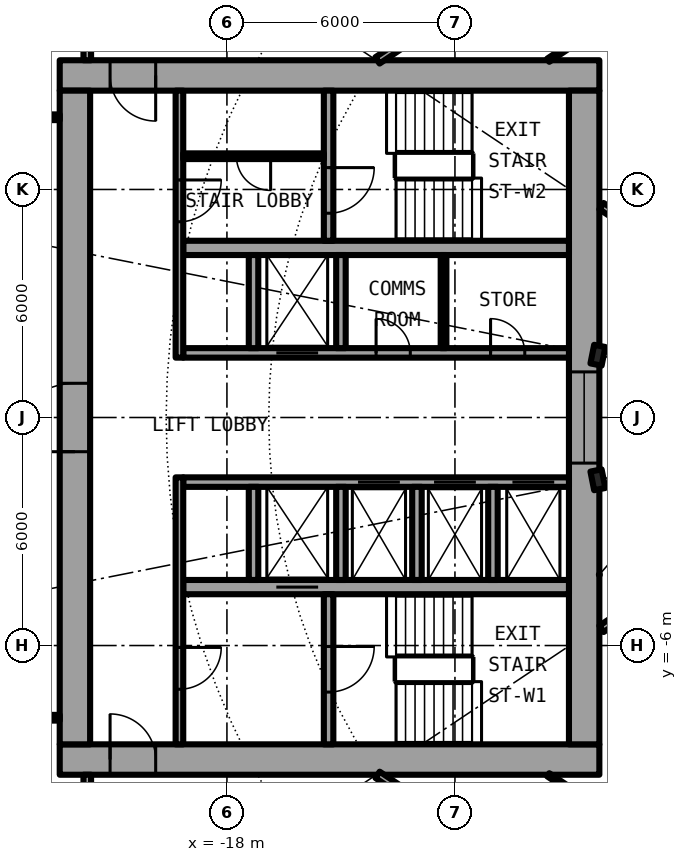
"""IFC4 building model, lengths in metres.
Left out: names, types, materials, properties, quantities, classifications, styles, units other than length and angle.
Written with IfcOpenShell. Run it as: python <this file> out.ifc"""

import sys

from ifc_helpers import new_model, si_unit, direction, frame, frame_2d, origin, origin_2d, place, context, subcontext, project, spatial, rectangle, i_section, extrude, element, fill, save


model = new_model("IFC4")
c1 = context("Model", 3, precision=1e-05, world=origin(), true_north=direction((0.0, 1.0)))
c2 = subcontext(c1, "Body", "Model", "MODEL_VIEW")
j1 = project(units=[si_unit("LENGTHUNIT", "METRE"), si_unit("PLANEANGLEUNIT", "RADIAN")], contexts=[c1])
p1 = place(None, origin())
s1 = spatial("IfcSite", under=j1, at=p1, CompositionType="ELEMENT")
p2 = place(p1, origin())
s2 = spatial("IfcBuilding", under=s1, at=p2, CompositionType="ELEMENT")
p3 = place(p2, frame((0.0, 0.0, 28.9)))
s3 = spatial("IfcBuildingStorey", under=s2, at=p3, CompositionType="ELEMENT", Elevation=28.9)
for number, where, z_axis, x_axis in (
    (1, (-8.239, 1.639, 0.0), (0.0, 0.0, 1.0), (-0.981, 0.195, 0.0)),
    (2, (-8.239, -1.639, 0.0), (0.0, 0.0, 1.0), (-0.981, -0.195, 0.0)),
):
    element("IfcColumn", number, at=place(p3, frame(where, z_axis=z_axis, x_axis=x_axis)), inside=s3, PredefinedType="COLUMN", context=c2, shape_type="SweptSolid", body=[
        extrude(i_section(OverallWidth=0.3, OverallDepth=0.5, WebThickness=0.014, FlangeThickness=0.028, FilletRadius=0.027, at=origin_2d()), origin(), (0.0, 0.0, 1.0), 3.05),
    ])
p4 = place(p3, frame((-22.4, -9.0, 0.0), z_axis=(0.0, 0.0, 1.0), x_axis=(1.0, 0.0, 0.0)))
e3 = element("IfcWall", 3, at=p4, inside=s3, PredefinedType="SHEAR", context=c2, shape_type="SweptSolid", body=[
    extrude(rectangle(XDim=14.2, YDim=0.8, at=frame_2d((7.1, 0.0))), origin(), (0.0, 0.0, 1.0), 3.05),
])
p5 = place(p4, frame((1.325, 0.0, 0.0)))
e4 = element("IfcOpeningElement", 4, at=p5, cuts=e3, PredefinedType="OPENING", context=c2, shape_type="SweptSolid", body=[
    extrude(rectangle(XDim=1.2, YDim=2.3, at=frame_2d((0.6, 1.15))), frame((0.0, 0.41, 0.0), z_axis=(0.0, -1.0, 0.0), x_axis=(1.0, 0.0, 0.0)), (0.0, 0.0, 1.0), 0.82),
])
p6 = place(p3, frame((-8.2, 9.0, 0.0), z_axis=(0.0, 0.0, 1.0), x_axis=(-1.0, 0.0, 0.0)))
e5 = element("IfcWall", 5, at=p6, inside=s3, PredefinedType="SHEAR", context=c2, shape_type="SweptSolid", body=[
    extrude(rectangle(XDim=14.2, YDim=0.8, at=frame_2d((7.1, 0.0))), origin(), (0.0, 0.0, 1.0), 3.05),
])
p7 = place(p6, frame((11.675, 0.0, 0.0)))
e6 = element("IfcOpeningElement", 6, at=p7, cuts=e5, PredefinedType="OPENING", context=c2, shape_type="SweptSolid", body=[
    extrude(rectangle(XDim=1.2, YDim=2.3, at=frame_2d((0.6, 1.15))), frame((0.0, 0.41, 0.0), z_axis=(0.0, -1.0, 0.0), x_axis=(1.0, 0.0, 0.0)), (0.0, 0.0, 1.0), 0.82),
])
p8 = place(p3, frame((-22.0, -8.6, 0.0), z_axis=(0.0, 0.0, 1.0), x_axis=(0.0, 1.0, 0.0)))
e7 = element("IfcWall", 7, at=p8, inside=s3, PredefinedType="SHEAR", context=c2, shape_type="SweptSolid", body=[
    extrude(rectangle(XDim=17.2, YDim=0.8, at=frame_2d((8.6, 0.0))), origin(), (0.0, 0.0, 1.0), 3.05),
])
p9 = place(p8, frame((7.7, 0.0, 0.0)))
e8 = element("IfcOpeningElement", 8, at=p9, cuts=e7, PredefinedType="OPENING", context=c2, shape_type="SweptSolid", body=[
    extrude(rectangle(XDim=1.8, YDim=2.3, at=frame_2d((0.9, 1.15))), frame((0.0, 0.41, 0.0), z_axis=(0.0, -1.0, 0.0), x_axis=(1.0, 0.0, 0.0)), (0.0, 0.0, 1.0), 0.82),
])
p10 = place(p3, frame((-8.6, 8.6, 0.0), z_axis=(0.0, 0.0, 1.0), x_axis=(0.0, -1.0, 0.0)))
e9 = element("IfcWall", 9, at=p10, inside=s3, PredefinedType="SHEAR", context=c2, shape_type="SweptSolid", body=[
    extrude(rectangle(XDim=17.2, YDim=0.8, at=frame_2d((8.6, 0.0))), origin(), (0.0, 0.0, 1.0), 3.05),
])
p11 = place(p10, frame((7.4, 0.0, 0.1)))
e10 = element("IfcOpeningElement", 10, at=p11, cuts=e9, PredefinedType="OPENING", context=c2, shape_type="SweptSolid", body=[
    extrude(rectangle(XDim=2.4, YDim=2.2, at=frame_2d((1.2, 1.1))), frame((0.0, 0.41, 0.0), z_axis=(0.0, -1.0, 0.0), x_axis=(1.0, 0.0, 0.0)), (0.0, 0.0, 1.0), 0.82),
])
p12 = place(p3, frame((-9.0, -1.7, 0.0), z_axis=(0.0, 0.0, 1.0), x_axis=(-1.0, 0.0, 0.0)))
e11 = element("IfcWall", 11, at=p12, inside=s3, PredefinedType="SHEAR", context=c2, shape_type="SweptSolid", body=[
    extrude(rectangle(XDim=10.15, YDim=0.25, at=frame_2d((5.075, 0.0))), origin(), (0.0, 0.0, 1.0), 3.05),
])
p13 = place(p12, frame((0.387, 0.0, 0.0)))
e12 = element("IfcOpeningElement", 12, at=p13, cuts=e11, PredefinedType="OPENING", context=c2, shape_type="SweptSolid", body=[
    extrude(rectangle(XDim=1.1, YDim=2.3, at=frame_2d((0.55, 1.15))), frame((0.0, 0.135, 0.0), z_axis=(0.0, -1.0, 0.0), x_axis=(1.0, 0.0, 0.0)), (0.0, 0.0, 1.0), 0.27),
])
p14 = place(p12, frame((2.45, 0.0, 0.0)))
e13 = element("IfcOpeningElement", 13, at=p14, cuts=e11, PredefinedType="OPENING", context=c2, shape_type="SweptSolid", body=[
    extrude(rectangle(XDim=1.1, YDim=2.3, at=frame_2d((0.55, 1.15))), frame((0.0, 0.135, 0.0), z_axis=(0.0, -1.0, 0.0), x_axis=(1.0, 0.0, 0.0)), (0.0, 0.0, 1.0), 0.27),
])
p15 = place(p12, frame((4.45, 0.0, 0.0)))
e14 = element("IfcOpeningElement", 14, at=p15, cuts=e11, PredefinedType="OPENING", context=c2, shape_type="SweptSolid", body=[
    extrude(rectangle(XDim=1.1, YDim=2.3, at=frame_2d((0.55, 1.15))), frame((0.0, 0.135, 0.0), z_axis=(0.0, -1.0, 0.0), x_axis=(1.0, 0.0, 0.0)), (0.0, 0.0, 1.0), 0.27),
])
p16 = place(p3, frame((-9.0, -4.462, 0.0), z_axis=(0.0, 0.0, 1.0), x_axis=(-1.0, 0.0, 0.0)))
e15 = element("IfcWall", 15, at=p16, inside=s3, PredefinedType="SHEAR", context=c2, shape_type="SweptSolid", body=[
    extrude(rectangle(XDim=10.15, YDim=0.375, at=frame_2d((5.075, 0.0))), origin(), (0.0, 0.0, 1.0), 3.05),
])
p17 = place(p16, frame((6.6, 0.0, 0.0)))
e16 = element("IfcOpeningElement", 16, at=p17, cuts=e15, PredefinedType="OPENING", context=c2, shape_type="SweptSolid", body=[
    extrude(rectangle(XDim=1.1, YDim=2.3, at=frame_2d((0.55, 1.15))), frame((0.0, 0.198, 0.0), z_axis=(0.0, -1.0, 0.0), x_axis=(1.0, 0.0, 0.0)), (0.0, 0.0, 1.0), 0.395),
])
p18 = place(p3, frame((-15.325, -4.65, 0.0), z_axis=(0.0, 0.0, 1.0), x_axis=(0.0, -1.0, 0.0)))
e17 = element("IfcWall", 17, at=p18, inside=s3, PredefinedType="SHEAR", context=c2, shape_type="SweptSolid", body=[
    extrude(rectangle(XDim=3.95, YDim=0.25, at=frame_2d((1.975, 0.0))), origin(), (0.0, 0.0, 1.0), 3.05),
])
p19 = place(p18, frame((1.375, 0.0, 0.0)))
e18 = element("IfcOpeningElement", 18, at=p19, cuts=e17, PredefinedType="OPENING", context=c2, shape_type="SweptSolid", body=[
    extrude(rectangle(XDim=1.2, YDim=2.3, at=frame_2d((0.6, 1.15))), frame((0.0, 0.135, 0.0), z_axis=(0.0, -1.0, 0.0), x_axis=(1.0, 0.0, 0.0)), (0.0, 0.0, 1.0), 0.27),
])
for number, where, z_axis, x_axis in (
    (19, (-15.0, -1.825, 0.0), (0.0, 0.0, 1.0), (0.0, -1.0, 0.0)),
    (20, (-17.3, -1.825, 0.0), (0.0, 0.0, 1.0), (0.0, -1.0, 0.0)),
):
    element("IfcWall", number, at=place(p3, frame(where, z_axis=z_axis, x_axis=x_axis)), inside=s3, PredefinedType="SOLIDWALL", context=c2, shape_type="SweptSolid", body=[
        extrude(rectangle(XDim=2.45, YDim=0.25, at=frame_2d((1.225, 0.0))), origin(), (0.0, 0.0, 1.0), 2.7),
    ])
p20 = place(p3, frame((-19.25, -1.575, 0.0), z_axis=(0.0, 0.0, 1.0), x_axis=(0.0, -1.0, 0.0)))
e21 = element("IfcWall", 21, at=p20, inside=s3, PredefinedType="SOLIDWALL", context=c2, shape_type="SweptSolid", body=[
    extrude(rectangle(XDim=7.025, YDim=0.2, at=frame_2d((3.513, 0.0))), origin(), (0.0, 0.0, 1.0), 2.7),
])
p21 = place(p20, frame((4.475, 0.0, 0.0)))
e22 = element("IfcOpeningElement", 22, at=p21, cuts=e21, PredefinedType="OPENING", context=c2, shape_type="SweptSolid", body=[
    extrude(rectangle(XDim=1.1, YDim=2.3, at=frame_2d((0.55, 1.15))), frame((0.0, 0.11, 0.0), z_axis=(0.0, -1.0, 0.0), x_axis=(1.0, 0.0, 0.0)), (0.0, 0.0, 1.0), 0.22),
])
p22 = place(p3, frame((-19.15, 1.7, 0.0), z_axis=(0.0, 0.0, 1.0), x_axis=(1.0, 0.0, 0.0)))
e23 = element("IfcWall", 23, at=p22, inside=s3, PredefinedType="SHEAR", context=c2, shape_type="SweptSolid", body=[
    extrude(rectangle(XDim=10.15, YDim=0.25, at=frame_2d((5.075, 0.0))), origin(), (0.0, 0.0, 1.0), 3.05),
])
p23 = place(p22, frame((2.45, 0.0, 0.0)))
e24 = element("IfcOpeningElement", 24, at=p23, cuts=e23, PredefinedType="OPENING", context=c2, shape_type="SweptSolid", body=[
    extrude(rectangle(XDim=1.1, YDim=2.3, at=frame_2d((0.55, 1.15))), frame((0.0, 0.135, 0.0), z_axis=(0.0, -1.0, 0.0), x_axis=(1.0, 0.0, 0.0)), (0.0, 0.0, 1.0), 0.27),
])
p24 = place(p22, frame((8.087, 0.0, 0.0)))
e25 = element("IfcOpeningElement", 25, at=p24, cuts=e23, PredefinedType="OPENING", context=c2, shape_type="SweptSolid", body=[
    extrude(rectangle(XDim=0.9, YDim=2.3, at=frame_2d((0.45, 1.15))), frame((0.0, 0.135, 0.0), z_axis=(0.0, -1.0, 0.0), x_axis=(1.0, 0.0, 0.0)), (0.0, 0.0, 1.0), 0.27),
])
p25 = place(p22, frame((5.075, 0.0, 0.0)))
e26 = element("IfcOpeningElement", 26, at=p25, cuts=e23, PredefinedType="OPENING", context=c2, shape_type="SweptSolid", body=[
    extrude(rectangle(XDim=0.9, YDim=2.3, at=frame_2d((0.45, 1.15))), frame((0.0, 0.135, 0.0), z_axis=(0.0, -1.0, 0.0), x_axis=(1.0, 0.0, 0.0)), (0.0, 0.0, 1.0), 0.27),
])
p26 = place(p3, frame((-9.0, 4.462, 0.0), z_axis=(0.0, 0.0, 1.0), x_axis=(-1.0, 0.0, 0.0)))
e27 = element("IfcWall", 27, at=p26, inside=s3, PredefinedType="SHEAR", context=c2, shape_type="SweptSolid", body=[
    extrude(rectangle(XDim=10.15, YDim=0.375, at=frame_2d((5.075, 0.0))), origin(), (0.0, 0.0, 1.0), 3.05),
])
p27 = place(p3, frame((-15.325, 8.6, 0.0), z_axis=(0.0, 0.0, 1.0), x_axis=(0.0, -1.0, 0.0)))
e28 = element("IfcWall", 28, at=p27, inside=s3, PredefinedType="SHEAR", context=c2, shape_type="SweptSolid", body=[
    extrude(rectangle(XDim=3.95, YDim=0.25, at=frame_2d((1.975, 0.0))), origin(), (0.0, 0.0, 1.0), 3.05),
])
p28 = place(p27, frame((2.025, 0.0, 0.0)))
e29 = element("IfcOpeningElement", 29, at=p28, cuts=e28, PredefinedType="OPENING", context=c2, shape_type="SweptSolid", body=[
    extrude(rectangle(XDim=1.2, YDim=2.3, at=frame_2d((0.6, 1.15))), frame((0.0, 0.135, 0.0), z_axis=(0.0, -1.0, 0.0), x_axis=(1.0, 0.0, 0.0)), (0.0, 0.0, 1.0), 0.27),
])
for number, where, z_axis, x_axis in (
    (30, (-15.0, 1.825, 0.0), (0.0, 0.0, 1.0), (0.0, 1.0, 0.0)),
    (31, (-17.3, 1.825, 0.0), (0.0, 0.0, 1.0), (0.0, 1.0, 0.0)),
):
    element("IfcWall", number, at=place(p3, frame(where, z_axis=z_axis, x_axis=x_axis)), inside=s3, PredefinedType="SOLIDWALL", context=c2, shape_type="SweptSolid", body=[
        extrude(rectangle(XDim=2.45, YDim=0.25, at=frame_2d((1.225, 0.0))), origin(), (0.0, 0.0, 1.0), 2.7),
    ])
p29 = place(p3, frame((-19.25, 8.6, 0.0), z_axis=(0.0, 0.0, 1.0), x_axis=(0.0, -1.0, 0.0)))
e32 = element("IfcWall", 32, at=p29, inside=s3, PredefinedType="SOLIDWALL", context=c2, shape_type="SweptSolid", body=[
    extrude(rectangle(XDim=7.025, YDim=0.2, at=frame_2d((3.513, 0.0))), origin(), (0.0, 0.0, 1.0), 2.7),
])
p30 = place(p29, frame((2.35, 0.0, 0.0)))
e33 = element("IfcOpeningElement", 33, at=p30, cuts=e32, PredefinedType="OPENING", context=c2, shape_type="SweptSolid", body=[
    extrude(rectangle(XDim=1.1, YDim=2.3, at=frame_2d((0.55, 1.15))), frame((0.0, 0.11, 0.0), z_axis=(0.0, -1.0, 0.0), x_axis=(1.0, 0.0, 0.0)), (0.0, 0.0, 1.0), 0.22),
])
for number, where, z_axis, x_axis in (
    (34, (-11.0, -1.825, 0.0), (0.0, 0.0, 1.0), (0.0, -1.0, 0.0)),
    (35, (-13.0, -1.825, 0.0), (0.0, 0.0, 1.0), (0.0, -1.0, 0.0)),
):
    element("IfcWall", number, at=place(p3, frame(where, z_axis=z_axis, x_axis=x_axis)), inside=s3, PredefinedType="SOLIDWALL", context=c2, shape_type="SweptSolid", body=[
        extrude(rectangle(XDim=2.45, YDim=0.25, at=frame_2d((1.225, 0.0))), origin(), (0.0, 0.0, 1.0), 2.7),
    ])
p31 = place(p3, frame((-12.3, 1.825, 0.0), z_axis=(0.0, 0.0, 1.0), x_axis=(0.0, 1.0, 0.0)))
e36 = element("IfcWall", 36, at=p31, inside=s3, PredefinedType="PARTITIONING", context=c2, shape_type="SweptSolid", body=[
    extrude(rectangle(XDim=2.45, YDim=0.15, at=frame_2d((1.225, 0.0))), origin(), (0.0, 0.0, 1.0), 2.7),
])
p32 = place(p3, frame((-15.45, 6.875, 0.0), z_axis=(0.0, 0.0, 1.0), x_axis=(-1.0, 0.0, 0.0)))
e37 = element("IfcWall", 37, at=p32, inside=s3, PredefinedType="PARTITIONING", context=c2, shape_type="SweptSolid", body=[
    extrude(rectangle(XDim=3.7, YDim=0.15, at=frame_2d((1.85, 0.0))), origin(), (0.0, 0.0, 1.0), 2.7),
])
p33 = place(p32, frame((1.4, 0.0, 0.0)))
e38 = element("IfcOpeningElement", 38, at=p33, cuts=e37, PredefinedType="OPENING", context=c2, shape_type="SweptSolid", body=[
    extrude(rectangle(XDim=0.9, YDim=2.3, at=frame_2d((0.45, 1.15))), frame((0.0, 0.085, 0.0), z_axis=(0.0, -1.0, 0.0), x_axis=(1.0, 0.0, 0.0)), (0.0, 0.0, 1.0), 0.17),
])
for number, where, z_axis, x_axis in (
    (39, (-22.4, 7.9, 0.0), (0.0, 0.0, 1.0), (-1.0, 0.0, 0.0)),
    (40, (-22.4, -7.9, 0.0), (0.0, 0.0, 1.0), (-1.0, 0.0, 0.0)),
):
    element("IfcWall", number, at=place(p3, frame(where, z_axis=z_axis, x_axis=x_axis)), inside=s3, PredefinedType="PARTITIONING", context=c2, shape_type="SweptSolid", body=[
        extrude(rectangle(XDim=2.54, YDim=0.15, at=frame_2d((1.27, 0.0))), origin(), (0.0, 0.0, 1.0), 2.7),
    ])
p34 = place(p3, frame((-14.036, -9.402, 0.0), z_axis=(0.0, 0.0, 1.0), x_axis=(0.831561346449, -0.555432918625, 0.0)))
e41 = element("IfcWall", 41, at=p34, inside=s3, PredefinedType="PARTITIONING", context=c2, shape_type="SweptSolid", body=[
    extrude(rectangle(XDim=12.914, YDim=0.2, at=frame_2d((6.457, 0.0))), origin(), (0.0, 0.0, 1.0), 2.7),
])
p35 = place(p34, frame((7.566, 0.0, 0.0)))
e42 = element("IfcOpeningElement", 42, at=p35, cuts=e41, PredefinedType="OPENING", context=c2, shape_type="SweptSolid", body=[
    extrude(rectangle(XDim=1.0, YDim=2.3, at=frame_2d((0.5, 1.15))), frame((0.0, 0.11, 0.0), z_axis=(0.0, -1.0, 0.0), x_axis=(1.0, 0.0, 0.0)), (0.0, 0.0, 1.0), 0.22),
])
p36 = place(p3, frame((-9.545, -9.401, 0.0), z_axis=(0.0, 0.0, 1.0), x_axis=(0.831459707426, -0.555585056429, 0.0)))
e43 = element("IfcWall", 43, at=p36, inside=s3, PredefinedType="PARTITIONING", context=c2, shape_type="SweptSolid", body=[
    extrude(rectangle(XDim=4.073, YDim=0.1, at=frame_2d((2.037, 0.0))), origin(), (0.0, 0.0, 1.0), 2.7),
])
for number, where, z_axis, x_axis in (
    (44, (-6.513, -4.472, 0.0), (0.0, 0.0, 1.0), (-0.831, -0.556, 0.0)),
    (45, (-6.513, 4.472, 0.0), (0.0, 0.0, 1.0), (-0.831, 0.556, 0.0)),
):
    element("IfcWall", number, at=place(p3, frame(where, z_axis=z_axis, x_axis=x_axis)), inside=s3, PredefinedType="PARTITIONING", context=c2, shape_type="SweptSolid", body=[
        extrude(rectangle(XDim=1.962, YDim=0.2, at=frame_2d((0.981, 0.0))), origin(), (0.0, 0.0, 1.0), 2.7),
    ])
p37 = place(p3, frame((-9.546, 9.4, 0.0), z_axis=(0.0, 0.0, 1.0), x_axis=(0.831459707426, 0.555585056429, 0.0)))
e46 = element("IfcWall", 46, at=p37, inside=s3, PredefinedType="PARTITIONING", context=c2, shape_type="SweptSolid", body=[
    extrude(rectangle(XDim=4.073, YDim=0.1, at=frame_2d((2.037, 0.0))), origin(), (0.0, 0.0, 1.0), 2.7),
])
p38 = place(p3, frame((-14.039, 9.396, 0.0), z_axis=(0.0, 0.0, 1.0), x_axis=(0.831348689697, 0.555751163866, 0.0)))
e47 = element("IfcWall", 47, at=p38, inside=s3, PredefinedType="PARTITIONING", context=c2, shape_type="SweptSolid", body=[
    extrude(rectangle(XDim=12.914, YDim=0.2, at=frame_2d((6.457, 0.0))), origin(), (0.0, 0.0, 1.0), 2.7),
])
p39 = place(p38, frame((7.568, 0.0, 0.0)))
e48 = element("IfcOpeningElement", 48, at=p39, cuts=e47, PredefinedType="OPENING", context=c2, shape_type="SweptSolid", body=[
    extrude(rectangle(XDim=1.0, YDim=2.3, at=frame_2d((0.5, 1.15))), frame((0.0, 0.11, 0.0), z_axis=(0.0, -1.0, 0.0), x_axis=(1.0, 0.0, 0.0)), (0.0, 0.0, 1.0), 0.22),
])
for number, where, z_axis, x_axis in (
    (49, (-21.675, -11.0, 0.0), (0.0, 0.0, 1.0), (0.0, 1.0, 0.0)),
    (50, (-21.675, 9.4, 0.0), (0.0, 0.0, 1.0), (0.0, 1.0, 0.0)),
):
    element("IfcWall", number, at=place(p3, frame(where, z_axis=z_axis, x_axis=x_axis)), inside=s3, PredefinedType="PARTITIONING", context=c2, shape_type="SweptSolid", body=[
        extrude(rectangle(XDim=1.6, YDim=0.2, at=frame_2d((0.8, 0.0))), origin(), (0.0, 0.0, 1.0), 2.7),
    ])
p40 = place(p13, origin())
e51 = element("IfcDoor", 51, at=p40, inside=s3, OperationType="DOUBLE_DOOR_SLIDING", PredefinedType="DOOR", context=c2, shape_type="SweptSolid", body=[
    extrude(rectangle(XDim=1.1, YDim=2.3, at=frame_2d((0.55, 1.15))), frame((0.0, 0.025, 0.0), z_axis=(0.0, -1.0, 0.0), x_axis=(1.0, 0.0, 0.0)), (0.0, 0.0, 1.0), 0.05),
])
fill(e12, e51)
p41 = place(p14, origin())
e52 = element("IfcDoor", 52, at=p41, inside=s3, OperationType="DOUBLE_DOOR_SLIDING", PredefinedType="DOOR", context=c2, shape_type="SweptSolid", body=[
    extrude(rectangle(XDim=1.1, YDim=2.3, at=frame_2d((0.55, 1.15))), frame((0.0, 0.025, 0.0), z_axis=(0.0, -1.0, 0.0), x_axis=(1.0, 0.0, 0.0)), (0.0, 0.0, 1.0), 0.05),
])
fill(e13, e52)
p42 = place(p15, origin())
e53 = element("IfcDoor", 53, at=p42, inside=s3, OperationType="DOUBLE_DOOR_SLIDING", PredefinedType="DOOR", context=c2, shape_type="SweptSolid", body=[
    extrude(rectangle(XDim=1.1, YDim=2.3, at=frame_2d((0.55, 1.15))), frame((0.0, 0.025, 0.0), z_axis=(0.0, -1.0, 0.0), x_axis=(1.0, 0.0, 0.0)), (0.0, 0.0, 1.0), 0.05),
])
fill(e14, e53)
p43 = place(p17, origin())
e54 = element("IfcDoor", 54, at=p43, inside=s3, OperationType="DOUBLE_DOOR_SLIDING", PredefinedType="DOOR", context=c2, shape_type="SweptSolid", body=[
    extrude(rectangle(XDim=1.1, YDim=2.3, at=frame_2d((0.55, 1.15))), frame((0.0, 0.025, 0.0), z_axis=(0.0, -1.0, 0.0), x_axis=(1.0, 0.0, 0.0)), (0.0, 0.0, 1.0), 0.05),
])
fill(e16, e54)
p44 = place(p23, origin())
e55 = element("IfcDoor", 55, at=p44, inside=s3, OperationType="DOUBLE_DOOR_SLIDING", PredefinedType="DOOR", context=c2, shape_type="SweptSolid", body=[
    extrude(rectangle(XDim=1.1, YDim=2.3, at=frame_2d((0.55, 1.15))), frame((0.0, 0.025, 0.0), z_axis=(0.0, -1.0, 0.0), x_axis=(1.0, 0.0, 0.0)), (0.0, 0.0, 1.0), 0.05),
])
fill(e24, e55)
p45 = place(p24, origin())
e56 = element("IfcDoor", 56, at=p45, inside=s3, OperationType="SINGLE_SWING_LEFT", PredefinedType="DOOR", context=c2, shape_type="SweptSolid", body=[
    extrude(rectangle(XDim=0.9, YDim=2.3, at=frame_2d((0.45, 1.15))), frame((0.0, 0.025, 0.0), z_axis=(0.0, -1.0, 0.0), x_axis=(1.0, 0.0, 0.0)), (0.0, 0.0, 1.0), 0.05),
])
fill(e25, e56)
p46 = place(p25, origin())
e57 = element("IfcDoor", 57, at=p46, inside=s3, OperationType="SINGLE_SWING_LEFT", PredefinedType="DOOR", context=c2, shape_type="SweptSolid", body=[
    extrude(rectangle(XDim=0.9, YDim=2.3, at=frame_2d((0.45, 1.15))), frame((0.0, 0.025, 0.0), z_axis=(0.0, -1.0, 0.0), x_axis=(1.0, 0.0, 0.0)), (0.0, 0.0, 1.0), 0.05),
])
fill(e26, e57)
p47 = place(p33, origin())
e58 = element("IfcDoor", 58, at=p47, inside=s3, OperationType="SINGLE_SWING_LEFT", PredefinedType="DOOR", context=c2, shape_type="SweptSolid", body=[
    extrude(rectangle(XDim=0.9, YDim=2.3, at=frame_2d((0.45, 1.15))), frame((0.0, 0.025, 0.0), z_axis=(0.0, -1.0, 0.0), x_axis=(1.0, 0.0, 0.0)), (0.0, 0.0, 1.0), 0.05),
])
fill(e38, e58)
p48 = place(p19, origin())
e59 = element("IfcDoor", 59, at=p48, inside=s3, OperationType="SINGLE_SWING_LEFT", PredefinedType="DOOR", context=c2, shape_type="SweptSolid", body=[
    extrude(rectangle(XDim=1.2, YDim=2.3, at=frame_2d((0.6, 1.15))), frame((0.0, 0.025, 0.0), z_axis=(0.0, -1.0, 0.0), x_axis=(1.0, 0.0, 0.0)), (0.0, 0.0, 1.0), 0.05),
])
fill(e18, e59)
p49 = place(p28, origin())
e60 = element("IfcDoor", 60, at=p49, inside=s3, OperationType="SINGLE_SWING_LEFT", PredefinedType="DOOR", context=c2, shape_type="SweptSolid", body=[
    extrude(rectangle(XDim=1.2, YDim=2.3, at=frame_2d((0.6, 1.15))), frame((0.0, 0.025, 0.0), z_axis=(0.0, -1.0, 0.0), x_axis=(1.0, 0.0, 0.0)), (0.0, 0.0, 1.0), 0.05),
])
fill(e29, e60)
p50 = place(p21, origin())
e61 = element("IfcDoor", 61, at=p50, inside=s3, OperationType="SINGLE_SWING_LEFT", PredefinedType="DOOR", context=c2, shape_type="SweptSolid", body=[
    extrude(rectangle(XDim=1.1, YDim=2.3, at=frame_2d((0.55, 1.15))), frame((0.0, 0.025, 0.0), z_axis=(0.0, -1.0, 0.0), x_axis=(1.0, 0.0, 0.0)), (0.0, 0.0, 1.0), 0.05),
])
fill(e22, e61)
p51 = place(p30, origin())
e62 = element("IfcDoor", 62, at=p51, inside=s3, OperationType="SINGLE_SWING_RIGHT", PredefinedType="DOOR", context=c2, shape_type="SweptSolid", body=[
    extrude(rectangle(XDim=1.1, YDim=2.3, at=frame_2d((0.55, 1.15))), frame((0.0, 0.025, 0.0), z_axis=(0.0, -1.0, 0.0), x_axis=(1.0, 0.0, 0.0)), (0.0, 0.0, 1.0), 0.05),
])
fill(e33, e62)
p52 = place(p5, origin())
e63 = element("IfcDoor", 63, at=p52, inside=s3, OperationType="SINGLE_SWING_RIGHT", PredefinedType="DOOR", context=c2, shape_type="SweptSolid", body=[
    extrude(rectangle(XDim=1.2, YDim=2.3, at=frame_2d((0.6, 1.15))), frame((0.0, 0.025, 0.0), z_axis=(0.0, -1.0, 0.0), x_axis=(1.0, 0.0, 0.0)), (0.0, 0.0, 1.0), 0.05),
])
fill(e4, e63)
p53 = place(p7, origin())
e64 = element("IfcDoor", 64, at=p53, inside=s3, OperationType="SINGLE_SWING_LEFT", PredefinedType="DOOR", context=c2, shape_type="SweptSolid", body=[
    extrude(rectangle(XDim=1.2, YDim=2.3, at=frame_2d((0.6, 1.15))), frame((0.0, 0.025, 0.0), z_axis=(0.0, -1.0, 0.0), x_axis=(1.0, 0.0, 0.0)), (0.0, 0.0, 1.0), 0.05),
])
fill(e6, e64)
p54 = place(p9, origin())
e65 = element("IfcDoor", 65, at=p54, inside=s3, OperationType="SINGLE_SWING_LEFT", PredefinedType="DOOR", context=c2, shape_type="SweptSolid", body=[
    extrude(rectangle(XDim=1.8, YDim=2.3, at=frame_2d((0.9, 1.15))), frame((0.0, 0.025, 0.0), z_axis=(0.0, -1.0, 0.0), x_axis=(1.0, 0.0, 0.0)), (0.0, 0.0, 1.0), 0.05),
])
fill(e8, e65)
p55 = place(p11, origin())
e66 = element("IfcWindow", 66, at=p55, inside=s3, PartitioningType="SINGLE_PANEL", PredefinedType="WINDOW", context=c2, shape_type="SweptSolid", body=[
    extrude(rectangle(XDim=2.4, YDim=2.2, at=frame_2d((1.2, 1.1))), frame((0.0, 0.03, 0.0), z_axis=(0.0, -1.0, 0.0), x_axis=(1.0, 0.0, 0.0)), (0.0, 0.0, 1.0), 0.06),
])
fill(e10, e66)
save(model, sys.argv[1])
